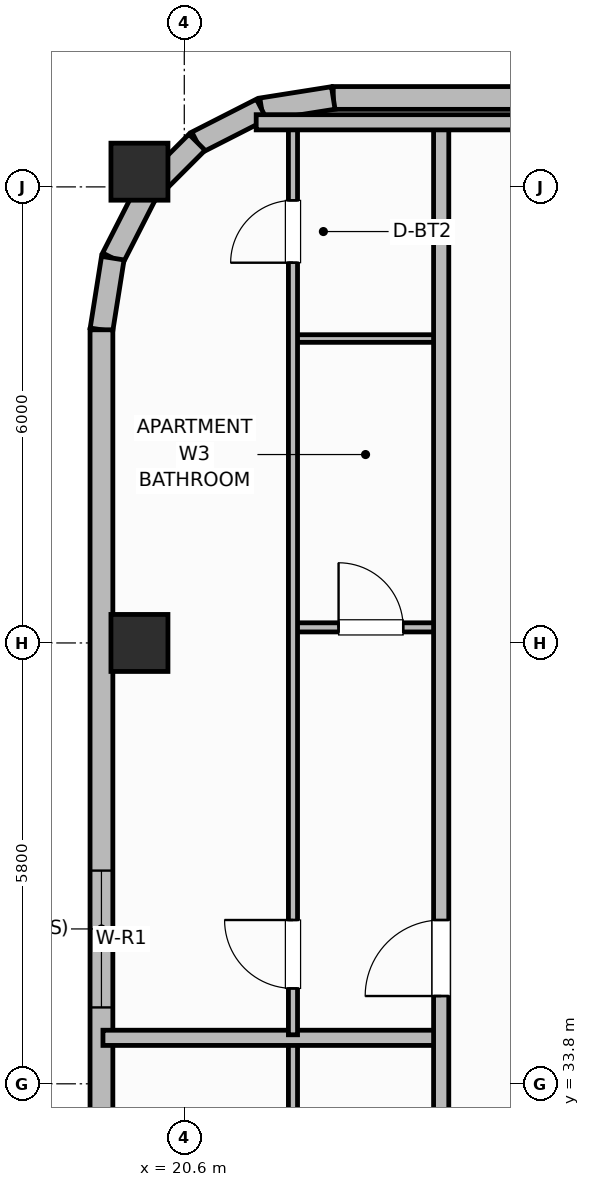
"""IFC4 building model, lengths in metres.
Left out: names, types, materials, properties, quantities, classifications, styles, units other than length and angle.
Written with IfcOpenShell. Run it as: python <this file> out.ifc"""

import sys

from ifc_helpers import new_model, si_unit, direction, frame, frame_2d, origin, origin_2d, place, context, subcontext, project, spatial, rectangle, extrude, element, fill, save


model = new_model("IFC4")
c1 = context("Model", 3, precision=1e-05, world=origin(), true_north=direction((0.0, 1.0)))
c2 = subcontext(c1, "Body", "Model", "MODEL_VIEW")
j1 = project(units=[si_unit("LENGTHUNIT", "METRE"), si_unit("PLANEANGLEUNIT", "RADIAN")], contexts=[c1])
p1 = place(None, origin())
s1 = spatial("IfcSite", under=j1, at=p1, CompositionType="ELEMENT")
p2 = place(p1, origin())
s2 = spatial("IfcBuilding", under=s1, at=p2, CompositionType="ELEMENT")
p3 = place(p2, frame((0.0, 0.0, 282.4)))
s3 = spatial("IfcBuildingStorey", under=s2, at=p3, CompositionType="ELEMENT", Elevation=282.4)
for number, where, z_axis, x_axis in (
    (1, (20.01, 39.6, 0.0), (0.0, 0.0, 1.0), (1.0, 0.0, 0.0)),
    (2, (20.01, 45.8, 0.0), (0.0, 0.0, 1.0), (1.0, 0.0, 0.0)),
):
    element("IfcColumn", number, at=place(p3, frame(where, z_axis=z_axis, x_axis=x_axis)), inside=s3, PredefinedType="COLUMN", context=c2, shape_type="SweptSolid", body=[
        extrude(rectangle(XDim=0.75, YDim=0.75, at=origin_2d()), origin(), (0.0, 0.0, 1.0), 3.7),
    ])
p4 = place(p3, frame((55.84, 46.77, 0.0), z_axis=(0.0, 0.0, 1.0), x_axis=(-1.0, 0.0, 0.0)))
e3 = element("IfcWall", 3, at=p4, inside=s3, PredefinedType="SOLIDWALL", context=c2, shape_type="SweptSolid", body=[
    extrude(rectangle(XDim=33.28, YDim=0.3, at=frame_2d((16.64, 0.0))), origin(), (0.0, 0.0, 1.0), 2.73),
])
p5 = place(p4, frame((5.596, 0.0, 0.71)))
e4 = element("IfcOpeningElement", 4, at=p5, cuts=e3, PredefinedType="OPENING", context=c2, shape_type="SweptSolid", body=[
    extrude(rectangle(XDim=2.1, YDim=1.9, at=frame_2d((1.05, 0.95))), frame((0.0, 0.16, 0.0), z_axis=(0.0, -1.0, 0.0), x_axis=(1.0, 0.0, 0.0)), (0.0, 0.0, 1.0), 0.32),
])
p6 = place(p4, frame((9.244, 0.0, 0.71)))
e5 = element("IfcOpeningElement", 5, at=p6, cuts=e3, PredefinedType="OPENING", context=c2, shape_type="SweptSolid", body=[
    extrude(rectangle(XDim=2.1, YDim=1.9, at=frame_2d((1.05, 0.95))), frame((0.0, 0.16, 0.0), z_axis=(0.0, -1.0, 0.0), x_axis=(1.0, 0.0, 0.0)), (0.0, 0.0, 1.0), 0.32),
])
p7 = place(p4, frame((13.941, 0.0, 0.71)))
e6 = element("IfcOpeningElement", 6, at=p7, cuts=e3, PredefinedType="OPENING", context=c2, shape_type="SweptSolid", body=[
    extrude(rectangle(XDim=2.1, YDim=1.9, at=frame_2d((1.05, 0.95))), frame((0.0, 0.16, 0.0), z_axis=(0.0, -1.0, 0.0), x_axis=(1.0, 0.0, 0.0)), (0.0, 0.0, 1.0), 0.32),
])
p8 = place(p4, frame((17.239, 0.0, 0.71)))
e7 = element("IfcOpeningElement", 7, at=p8, cuts=e3, PredefinedType="OPENING", context=c2, shape_type="SweptSolid", body=[
    extrude(rectangle(XDim=2.1, YDim=1.9, at=frame_2d((1.05, 0.95))), frame((0.0, 0.16, 0.0), z_axis=(0.0, -1.0, 0.0), x_axis=(1.0, 0.0, 0.0)), (0.0, 0.0, 1.0), 0.32),
])
p9 = place(p4, frame((21.936, 0.0, 0.71)))
e8 = element("IfcOpeningElement", 8, at=p9, cuts=e3, PredefinedType="OPENING", context=c2, shape_type="SweptSolid", body=[
    extrude(rectangle(XDim=2.1, YDim=1.9, at=frame_2d((1.05, 0.95))), frame((0.0, 0.16, 0.0), z_axis=(0.0, -1.0, 0.0), x_axis=(1.0, 0.0, 0.0)), (0.0, 0.0, 1.0), 0.32),
])
p10 = place(p4, frame((25.584, 0.0, 0.71)))
e9 = element("IfcOpeningElement", 9, at=p10, cuts=e3, PredefinedType="OPENING", context=c2, shape_type="SweptSolid", body=[
    extrude(rectangle(XDim=2.1, YDim=1.9, at=frame_2d((1.05, 0.95))), frame((0.0, 0.16, 0.0), z_axis=(0.0, -1.0, 0.0), x_axis=(1.0, 0.0, 0.0)), (0.0, 0.0, 1.0), 0.32),
])
p11 = place(p3, frame((22.56, 46.77, 0.0), z_axis=(0.0, 0.0, 1.0), x_axis=(-0.987669453596, -0.156553666304, 0.0)))
e10 = element("IfcWall", 10, at=p11, inside=s3, PredefinedType="SOLIDWALL", context=c2, shape_type="SweptSolid", body=[
    extrude(rectangle(XDim=0.954, YDim=0.3, at=frame_2d((0.477, 0.0))), origin(), (0.0, 0.0, 1.0), 2.73),
])
p12 = place(p3, frame((21.617, 46.621, 0.0), z_axis=(0.0, 0.0, 1.0), x_axis=(-0.891023873617, -0.45395644796, 0.0)))
e11 = element("IfcWall", 11, at=p12, inside=s3, PredefinedType="SOLIDWALL", context=c2, shape_type="SweptSolid", body=[
    extrude(rectangle(XDim=0.954, YDim=0.3, at=frame_2d((0.477, 0.0))), origin(), (0.0, 0.0, 1.0), 2.73),
])
p13 = place(p3, frame((20.767, 46.188, 0.0), z_axis=(0.0, 0.0, 1.0), x_axis=(-0.707106781187, -0.707106781187, 0.0)))
e12 = element("IfcWall", 12, at=p13, inside=s3, PredefinedType="SOLIDWALL", context=c2, shape_type="SweptSolid", body=[
    extrude(rectangle(XDim=0.954, YDim=0.3, at=frame_2d((0.477, 0.0))), origin(), (0.0, 0.0, 1.0), 2.73),
])
p14 = place(p3, frame((20.093, 45.513, 0.0), z_axis=(0.0, 0.0, 1.0), x_axis=(-0.454159573051, -0.890920356825, 0.0)))
e13 = element("IfcWall", 13, at=p14, inside=s3, PredefinedType="SOLIDWALL", context=c2, shape_type="SweptSolid", body=[
    extrude(rectangle(XDim=0.954, YDim=0.3, at=frame_2d((0.477, 0.0))), origin(), (0.0, 0.0, 1.0), 2.73),
])
p15 = place(p3, frame((19.659, 44.663, 0.0), z_axis=(0.0, 0.0, 1.0), x_axis=(-0.156304114255, -0.987708977314, 0.0)))
e14 = element("IfcWall", 14, at=p15, inside=s3, PredefinedType="SOLIDWALL", context=c2, shape_type="SweptSolid", body=[
    extrude(rectangle(XDim=0.954, YDim=0.3, at=frame_2d((0.477, 0.0))), origin(), (0.0, 0.0, 1.0), 2.73),
])
p16 = place(p3, frame((19.51, 43.72, 0.0), z_axis=(0.0, 0.0, 1.0), x_axis=(0.0, -1.0, 0.0)))
e15 = element("IfcWall", 15, at=p16, inside=s3, PredefinedType="SOLIDWALL", context=c2, shape_type="SweptSolid", body=[
    extrude(rectangle(XDim=11.12, YDim=0.3, at=frame_2d((5.56, 0.0))), origin(), (0.0, 0.0, 1.0), 2.73),
])
p17 = place(p16, frame((7.115, 0.0, 0.76)))
e16 = element("IfcOpeningElement", 16, at=p17, cuts=e15, PredefinedType="OPENING", context=c2, shape_type="SweptSolid", body=[
    extrude(rectangle(XDim=1.8, YDim=1.85, at=frame_2d((0.9, 0.925))), frame((0.0, 0.16, 0.0), z_axis=(0.0, -1.0, 0.0), x_axis=(1.0, 0.0, 0.0)), (0.0, 0.0, 1.0), 0.32),
])
p18 = place(p3, frame((22.03, 22.74, 0.0), z_axis=(0.0, 0.0, 1.0), x_axis=(0.0, 1.0, 0.0)))
e17 = element("IfcWall", 17, at=p18, inside=s3, PredefinedType="PARTITIONING", context=c2, shape_type="SweptSolid", body=[
    extrude(rectangle(XDim=11.625, YDim=0.12, at=frame_2d((5.812, 0.0))), origin(), (0.0, 0.0, 1.0), 2.56),
])
p19 = place(p18, frame((0.61, 0.0, 0.0)))
e18 = element("IfcOpeningElement", 18, at=p19, cuts=e17, PredefinedType="OPENING", context=c2, shape_type="SweptSolid", body=[
    extrude(rectangle(XDim=0.9, YDim=2.1, at=frame_2d((0.45, 1.05))), frame((0.0, 0.07, 0.0), z_axis=(0.0, -1.0, 0.0), x_axis=(1.0, 0.0, 0.0)), (0.0, 0.0, 1.0), 0.14),
])
p20 = place(p3, frame((19.53, 34.405, 0.0), z_axis=(0.0, 0.0, 1.0), x_axis=(1.0, 0.0, 0.0)))
e19 = element("IfcWall", 19, at=p20, inside=s3, PredefinedType="PARTITIONING", context=c2, shape_type="SweptSolid", body=[
    extrude(rectangle(XDim=4.45, YDim=0.2, at=frame_2d((2.225, 0.0))), origin(), (0.0, 0.0, 1.0), 2.56),
])
p21 = place(p3, frame((22.03, 39.805, 0.0), z_axis=(0.0, 0.0, 1.0), x_axis=(1.0, 0.0, 0.0)))
e20 = element("IfcWall", 20, at=p21, inside=s3, PredefinedType="PARTITIONING", context=c2, shape_type="SweptSolid", body=[
    extrude(rectangle(XDim=1.95, YDim=0.12, at=frame_2d((0.975, 0.0))), origin(), (0.0, 0.0, 1.0), 2.56),
])
p22 = place(p21, frame((0.6, 0.0, 0.0)))
e21 = element("IfcOpeningElement", 21, at=p22, cuts=e20, PredefinedType="OPENING", context=c2, shape_type="SweptSolid", body=[
    extrude(rectangle(XDim=0.85, YDim=2.1, at=frame_2d((0.425, 1.05))), frame((0.0, 0.07, 0.0), z_axis=(0.0, -1.0, 0.0), x_axis=(1.0, 0.0, 0.0)), (0.0, 0.0, 1.0), 0.14),
])
p23 = place(p3, frame((22.03, 43.605, 0.0), z_axis=(0.0, 0.0, 1.0), x_axis=(1.0, 0.0, 0.0)))
e22 = element("IfcWall", 22, at=p23, inside=s3, PredefinedType="PARTITIONING", context=c2, shape_type="SweptSolid", body=[
    extrude(rectangle(XDim=1.95, YDim=0.1, at=frame_2d((0.975, 0.0))), origin(), (0.0, 0.0, 1.0), 2.56),
])
p24 = place(p3, frame((22.03, 34.445, 0.0), z_axis=(0.0, 0.0, 1.0), x_axis=(0.0, 1.0, 0.0)))
e23 = element("IfcWall", 23, at=p24, inside=s3, PredefinedType="PARTITIONING", context=c2, shape_type="SweptSolid", body=[
    extrude(rectangle(XDim=11.965, YDim=0.12, at=frame_2d((5.982, 0.0))), origin(), (0.0, 0.0, 1.0), 2.56),
])
p25 = place(p24, frame((0.61, 0.0, 0.0)))
e24 = element("IfcOpeningElement", 24, at=p25, cuts=e23, PredefinedType="OPENING", context=c2, shape_type="SweptSolid", body=[
    extrude(rectangle(XDim=0.9, YDim=2.1, at=frame_2d((0.45, 1.05))), frame((0.0, 0.07, 0.0), z_axis=(0.0, -1.0, 0.0), x_axis=(1.0, 0.0, 0.0)), (0.0, 0.0, 1.0), 0.14),
])
p26 = place(p24, frame((10.157, 0.0, 0.0)))
e25 = element("IfcOpeningElement", 25, at=p26, cuts=e23, PredefinedType="OPENING", context=c2, shape_type="SweptSolid", body=[
    extrude(rectangle(XDim=0.82, YDim=2.08, at=frame_2d((0.41, 1.04))), frame((0.0, 0.07, 0.0), z_axis=(0.0, -1.0, 0.0), x_axis=(1.0, 0.0, 0.0)), (0.0, 0.0, 1.0), 0.14),
])
p27 = place(p3, frame((23.98, 9.95, 0.0), z_axis=(0.0, 0.0, 1.0), x_axis=(0.0, 1.0, 0.0)))
e26 = element("IfcWall", 26, at=p27, inside=s3, PredefinedType="PARTITIONING", context=c2, shape_type="SweptSolid", body=[
    extrude(rectangle(XDim=36.5, YDim=0.2, at=frame_2d((18.25, 0.0))), origin(), (0.0, 0.0, 1.0), 2.56),
])
p28 = place(p27, frame((3.25, 0.0, 0.0)))
e27 = element("IfcOpeningElement", 27, at=p28, cuts=e26, PredefinedType="OPENING", context=c2, shape_type="SweptSolid", body=[
    extrude(rectangle(XDim=1.0, YDim=2.15, at=frame_2d((0.5, 1.075))), frame((0.0, 0.11, 0.0), z_axis=(0.0, -1.0, 0.0), x_axis=(1.0, 0.0, 0.0)), (0.0, 0.0, 1.0), 0.22),
])
p29 = place(p27, frame((13.3, 0.0, 0.0)))
e28 = element("IfcOpeningElement", 28, at=p29, cuts=e26, PredefinedType="OPENING", context=c2, shape_type="SweptSolid", body=[
    extrude(rectangle(XDim=1.0, YDim=2.15, at=frame_2d((0.5, 1.075))), frame((0.0, 0.11, 0.0), z_axis=(0.0, -1.0, 0.0), x_axis=(1.0, 0.0, 0.0)), (0.0, 0.0, 1.0), 0.22),
])
p30 = place(p27, frame((25.005, 0.0, 0.0)))
e29 = element("IfcOpeningElement", 29, at=p30, cuts=e26, PredefinedType="OPENING", context=c2, shape_type="SweptSolid", body=[
    extrude(rectangle(XDim=1.0, YDim=2.15, at=frame_2d((0.5, 1.075))), frame((0.0, 0.11, 0.0), z_axis=(0.0, -1.0, 0.0), x_axis=(1.0, 0.0, 0.0)), (0.0, 0.0, 1.0), 0.22),
])
p31 = place(p3, frame((21.546, 46.45, 0.0), z_axis=(0.0, 0.0, 1.0), x_axis=(1.0, 0.0, 0.0)))
e30 = element("IfcWall", 30, at=p31, inside=s3, PredefinedType="PARTITIONING", context=c2, shape_type="SweptSolid", body=[
    extrude(rectangle(XDim=3.754, YDim=0.2, at=frame_2d((1.877, 0.0))), origin(), (0.0, 0.0, 1.0), 2.56),
])
p32 = place(p17, origin())
e31 = element("IfcWindow", 31, at=p32, inside=s3, PartitioningType="SINGLE_PANEL", PredefinedType="WINDOW", context=c2, shape_type="SweptSolid", body=[
    extrude(rectangle(XDim=1.8, YDim=1.85, at=frame_2d((0.9, 0.925))), frame((0.0, 0.03, 0.0), z_axis=(0.0, -1.0, 0.0), x_axis=(1.0, 0.0, 0.0)), (0.0, 0.0, 1.0), 0.06),
])
fill(e16, e31)
p33 = place(p22, origin())
e32 = element("IfcDoor", 32, at=p33, inside=s3, OperationType="SINGLE_SWING_LEFT", PredefinedType="DOOR", context=c2, shape_type="SweptSolid", body=[
    extrude(rectangle(XDim=0.85, YDim=2.1, at=frame_2d((0.425, 1.05))), frame((0.0, 0.025, 0.0), z_axis=(0.0, -1.0, 0.0), x_axis=(1.0, 0.0, 0.0)), (0.0, 0.0, 1.0), 0.05),
])
fill(e21, e32)
p34 = place(p25, origin())
e33 = element("IfcDoor", 33, at=p34, inside=s3, OperationType="SINGLE_SWING_RIGHT", PredefinedType="DOOR", context=c2, shape_type="SweptSolid", body=[
    extrude(rectangle(XDim=0.9, YDim=2.1, at=frame_2d((0.45, 1.05))), frame((0.0, 0.025, 0.0), z_axis=(0.0, -1.0, 0.0), x_axis=(1.0, 0.0, 0.0)), (0.0, 0.0, 1.0), 0.05),
])
fill(e24, e33)
p35 = place(p26, origin())
e34 = element("IfcDoor", 34, at=p35, inside=s3, OperationType="SINGLE_SWING_LEFT", PredefinedType="DOOR", context=c2, shape_type="SweptSolid", body=[
    extrude(rectangle(XDim=0.82, YDim=2.08, at=frame_2d((0.41, 1.04))), frame((0.0, 0.025, 0.0), z_axis=(0.0, -1.0, 0.0), x_axis=(1.0, 0.0, 0.0)), (0.0, 0.0, 1.0), 0.05),
])
fill(e25, e34)
p36 = place(p30, origin())
e35 = element("IfcDoor", 35, at=p36, inside=s3, OperationType="SINGLE_SWING_LEFT", PredefinedType="DOOR", context=c2, shape_type="SweptSolid", body=[
    extrude(rectangle(XDim=1.0, YDim=2.15, at=frame_2d((0.5, 1.075))), frame((0.0, 0.025, 0.0), z_axis=(0.0, -1.0, 0.0), x_axis=(1.0, 0.0, 0.0)), (0.0, 0.0, 1.0), 0.05),
])
fill(e29, e35)
save(model, sys.argv[1])
